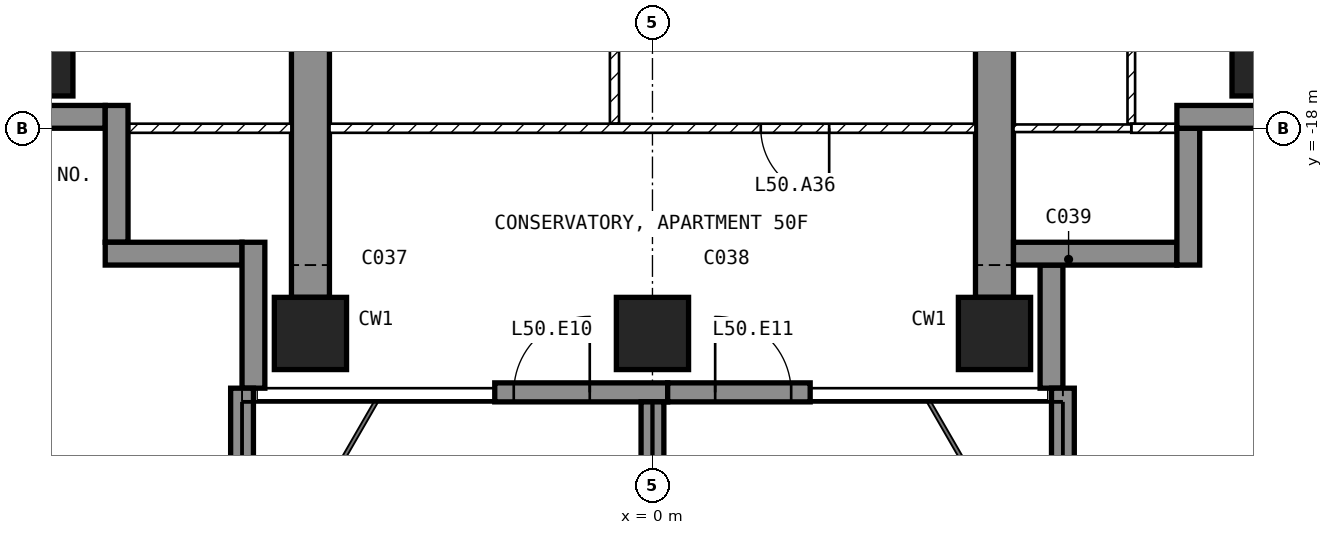
"""IFC4 building model, lengths in metres.
Left out: names, types, materials, properties, quantities, classifications, styles, units other than length and angle.
Written with IfcOpenShell. Run it as: python <this file> out.ifc"""

import sys

from ifc_helpers import new_model, si_unit, direction, frame, frame_2d, origin, origin_2d, place, context, subcontext, project, spatial, polyline, rectangle, outline, extrude, element, fill, save


model = new_model("IFC4")
c1 = context("Model", 3, precision=1e-05, world=origin(), true_north=direction((0.0, 1.0)))
c2 = subcontext(c1, "Body", "Model", "MODEL_VIEW")
j1 = project(units=[si_unit("LENGTHUNIT", "METRE"), si_unit("PLANEANGLEUNIT", "RADIAN")], contexts=[c1])
p1 = place(None, origin())
s1 = spatial("IfcSite", under=j1, at=p1, CompositionType="ELEMENT")
p2 = place(p1, origin())
s2 = spatial("IfcBuilding", under=s1, at=p2, CompositionType="ELEMENT")
p3 = place(p2, frame((0.0, 0.0, 201.6)))
s3 = spatial("IfcBuildingStorey", under=s2, at=p3, CompositionType="ELEMENT", Elevation=201.6)
for number, where, z_axis, x_axis in (
    (1, (-8.1, -17.1, -0.25), (0.0, 0.0, 1.0), (1.0, 0.0, 0.0)),
    (2, (-4.5, -20.7, -0.25), (0.0, 0.0, 1.0), (1.0, 0.0, 0.0)),
    (3, (0.0, -20.7, -0.25), (0.0, 0.0, 1.0), (1.0, 0.0, 0.0)),
    (4, (4.5, -20.7, -0.25), (0.0, 0.0, 1.0), (1.0, 0.0, 0.0)),
    (5, (8.1, -17.1, -0.25), (0.0, 0.0, 1.0), (1.0, 0.0, 0.0)),
):
    element("IfcColumn", number, at=place(p3, frame(where, z_axis=z_axis, x_axis=x_axis)), inside=s3, PredefinedType="COLUMN", context=c2, shape_type="SweptSolid", body=[
        extrude(rectangle(XDim=0.95, YDim=0.95, at=origin_2d()), origin(), (0.0, 0.0, 1.0), 3.5),
    ])
for number, where, z_axis, x_axis in (
    (6, (-4.75, -20.225, -0.25), (1.0, 0.0, 0.0), (0.0, 1.0, 0.0)),
    (7, (4.25, -20.225, -0.25), (1.0, 0.0, 0.0), (0.0, 1.0, 0.0)),
):
    element("IfcWall", number, at=place(p3, frame(where, z_axis=z_axis, x_axis=x_axis)), inside=s3, PredefinedType="SHEAR", context=c2, shape_type="SweptSolid", body=[
        extrude(outline(polyline([(0.0, 0.0), (6.725, 0.0), (6.725, 2.65), (9.125, 2.65), (9.125, 0.0), (11.225, 0.0), (11.225, 3.5), (0.0, 3.5), (0.0, 0.0)])), origin(), (0.0, 0.0, 1.0), 0.5),
    ])
p4 = place(p3, frame((-2.075, -21.475, 0.0), z_axis=(0.0, 0.0, 1.0), x_axis=(1.0, 0.0, 0.0)))
e8 = element("IfcWall", 8, at=p4, inside=s3, PredefinedType="SOLIDWALL", context=c2, shape_type="SweptSolid", body=[
    extrude(rectangle(XDim=2.275, YDim=0.25, at=frame_2d((1.137, 0.0))), origin(), (0.0, 0.0, 1.0), 3.25),
])
p5 = place(p4, frame((0.25, 0.0, 0.0)))
e9 = element("IfcOpeningElement", 9, at=p5, cuts=e8, PredefinedType="OPENING", context=c2, shape_type="SweptSolid", body=[
    extrude(rectangle(XDim=1.0, YDim=2.4, at=frame_2d((0.5, 1.2))), frame((0.0, 0.135, 0.0), z_axis=(0.0, -1.0, 0.0), x_axis=(1.0, 0.0, 0.0)), (0.0, 0.0, 1.0), 0.27),
])
p6 = place(p3, frame((0.2, -21.475, 0.0), z_axis=(0.0, 0.0, 1.0), x_axis=(1.0, 0.0, 0.0)))
e10 = element("IfcWall", 10, at=p6, inside=s3, PredefinedType="SOLIDWALL", context=c2, shape_type="SweptSolid", body=[
    extrude(rectangle(XDim=1.875, YDim=0.25, at=frame_2d((0.938, 0.0))), origin(), (0.0, 0.0, 1.0), 3.25),
])
p7 = place(p6, frame((0.625, 0.0, 0.0)))
e11 = element("IfcOpeningElement", 11, at=p7, cuts=e10, PredefinedType="OPENING", context=c2, shape_type="SweptSolid", body=[
    extrude(rectangle(XDim=1.0, YDim=2.4, at=frame_2d((0.5, 1.2))), frame((0.0, 0.135, 0.0), z_axis=(0.0, -1.0, 0.0), x_axis=(1.0, 0.0, 0.0)), (0.0, 0.0, 1.0), 0.27),
])
p8 = place(p3, frame((5.25, -21.42, 0.0), z_axis=(0.0, 0.0, 1.0), x_axis=(0.0, 1.0, 0.0)))
e12 = element("IfcWall", 12, at=p8, inside=s3, PredefinedType="SOLIDWALL", context=c2, shape_type="SweptSolid", body=[
    extrude(rectangle(XDim=1.62, YDim=0.3, at=frame_2d((0.81, 0.0))), origin(), (0.0, 0.0, 1.0), 3.25),
])
p9 = place(p3, frame((4.75, -19.65, 0.0), z_axis=(0.0, 0.0, 1.0), x_axis=(1.0, 0.0, 0.0)))
e13 = element("IfcWall", 13, at=p9, inside=s3, PredefinedType="SOLIDWALL", context=c2, shape_type="SweptSolid", body=[
    extrude(rectangle(XDim=2.15, YDim=0.3, at=frame_2d((1.075, 0.0))), origin(), (0.0, 0.0, 1.0), 3.25),
])
p10 = place(p3, frame((7.05, -19.8, 0.0), z_axis=(0.0, 0.0, 1.0), x_axis=(0.0, 1.0, 0.0)))
e14 = element("IfcWall", 14, at=p10, inside=s3, PredefinedType="SOLIDWALL", context=c2, shape_type="SweptSolid", body=[
    extrude(rectangle(XDim=1.8, YDim=0.3, at=frame_2d((0.9, 0.0))), origin(), (0.0, 0.0, 1.0), 3.25),
])
p11 = place(p3, frame((6.9, -17.85, 0.0), z_axis=(0.0, 0.0, 1.0), x_axis=(1.0, 0.0, 0.0)))
e15 = element("IfcWall", 15, at=p11, inside=s3, PredefinedType="SOLIDWALL", context=c2, shape_type="SweptSolid", body=[
    extrude(rectangle(XDim=1.85, YDim=0.3, at=frame_2d((0.925, 0.0))), origin(), (0.0, 0.0, 1.0), 3.25),
])
p12 = place(p3, frame((-8.75, -17.85, 0.0), z_axis=(0.0, 0.0, 1.0), x_axis=(1.0, 0.0, 0.0)))
e16 = element("IfcWall", 16, at=p12, inside=s3, PredefinedType="SOLIDWALL", context=c2, shape_type="SweptSolid", body=[
    extrude(rectangle(XDim=1.55, YDim=0.3, at=frame_2d((0.775, 0.0))), origin(), (0.0, 0.0, 1.0), 3.25),
])
for number, where, z_axis, x_axis in (
    (17, (-7.05, -17.7, 0.0), (0.0, 0.0, 1.0), (0.0, -1.0, 0.0)),
    (18, (-7.2, -19.65, 0.0), (0.0, 0.0, 1.0), (1.0, 0.0, 0.0)),
):
    element("IfcWall", number, at=place(p3, frame(where, z_axis=z_axis, x_axis=x_axis)), inside=s3, PredefinedType="SOLIDWALL", context=c2, shape_type="SweptSolid", body=[
        extrude(rectangle(XDim=1.8, YDim=0.3, at=frame_2d((0.9, 0.0))), origin(), (0.0, 0.0, 1.0), 3.25),
    ])
p13 = place(p3, frame((-5.25, -19.5, 0.0), z_axis=(0.0, 0.0, 1.0), x_axis=(0.0, -1.0, 0.0)))
e19 = element("IfcWall", 19, at=p13, inside=s3, PredefinedType="SOLIDWALL", context=c2, shape_type="SweptSolid", body=[
    extrude(rectangle(XDim=1.92, YDim=0.3, at=frame_2d((0.96, 0.0))), origin(), (0.0, 0.0, 1.0), 3.25),
])
p14 = place(p3, frame((-5.4, -21.42, 0.0), z_axis=(0.0, 0.0, 1.0), x_axis=(0.0, -1.0, 0.0)))
e20 = element("IfcWall", 20, at=p14, inside=s3, PredefinedType="SOLIDWALL", context=c2, shape_type="SweptSolid", body=[
    extrude(rectangle(XDim=2.88, YDim=0.3, at=frame_2d((1.44, 0.0))), origin(), (0.0, 0.0, 1.0), 3.25),
])
p15 = place(p3, frame((0.0, -21.6, 0.0), z_axis=(0.0, 0.0, 1.0), x_axis=(0.0, -1.0, 0.0)))
e21 = element("IfcWall", 21, at=p15, inside=s3, PredefinedType="SOLIDWALL", context=c2, shape_type="SweptSolid", body=[
    extrude(rectangle(XDim=2.7, YDim=0.3, at=frame_2d((1.35, 0.0))), origin(), (0.0, 0.0, 1.0), 3.25),
])
p16 = place(p3, frame((5.4, -21.42, 0.0), z_axis=(0.0, 0.0, 1.0), x_axis=(0.0, -1.0, 0.0)))
e22 = element("IfcWall", 22, at=p16, inside=s3, PredefinedType="SOLIDWALL", context=c2, shape_type="SweptSolid", body=[
    extrude(rectangle(XDim=2.88, YDim=0.3, at=frame_2d((1.44, 0.0))), origin(), (0.0, 0.0, 1.0), 3.25),
])
p17 = place(p3, frame((-0.5, -17.94, 0.0), z_axis=(0.0, 0.0, 1.0), x_axis=(0.0, 1.0, 0.0)))
e23 = element("IfcWall", 23, at=p17, inside=s3, PredefinedType="PARTITIONING", context=c2, shape_type="SweptSolid", body=[
    extrude(rectangle(XDim=2.88, YDim=0.12, at=frame_2d((1.44, 0.0))), origin(), (0.0, 0.0, 1.0), 3.25),
])
p18 = place(p17, frame((0.99, 0.0, 0.0)))
e24 = element("IfcOpeningElement", 24, at=p18, cuts=e23, PredefinedType="OPENING", context=c2, shape_type="SweptSolid", body=[
    extrude(rectangle(XDim=0.9, YDim=2.1, at=frame_2d((0.45, 1.05))), frame((0.0, 0.07, 0.0), z_axis=(0.0, -1.0, 0.0), x_axis=(1.0, 0.0, 0.0)), (0.0, 0.0, 1.0), 0.14),
])
p19 = place(p3, frame((4.25, -18.0, 0.0), z_axis=(0.0, 0.0, 1.0), x_axis=(-1.0, 0.0, 0.0)))
e25 = element("IfcWall", 25, at=p19, inside=s3, PredefinedType="PARTITIONING", context=c2, shape_type="SweptSolid", body=[
    extrude(rectangle(XDim=8.5, YDim=0.12, at=frame_2d((4.25, 0.0))), origin(), (0.0, 0.0, 1.0), 3.25),
])
p20 = place(p19, frame((1.925, 0.0, 0.0)))
e26 = element("IfcOpeningElement", 26, at=p20, cuts=e25, PredefinedType="OPENING", context=c2, shape_type="SweptSolid", body=[
    extrude(rectangle(XDim=0.9, YDim=2.1, at=frame_2d((0.45, 1.05))), frame((0.0, 0.07, 0.0), z_axis=(0.0, -1.0, 0.0), x_axis=(1.0, 0.0, 0.0)), (0.0, 0.0, 1.0), 0.14),
])
p21 = place(p3, frame((6.3, -17.94, 0.0), z_axis=(0.0, 0.0, 1.0), x_axis=(0.0, 1.0, 0.0)))
e27 = element("IfcWall", 27, at=p21, inside=s3, PredefinedType="PARTITIONING", context=c2, shape_type="SweptSolid", body=[
    extrude(rectangle(XDim=3.49, YDim=0.1, at=frame_2d((1.745, 0.0))), origin(), (0.0, 0.0, 1.0), 3.25),
])
p22 = place(p21, frame((1.32, 0.0, 0.0)))
e28 = element("IfcOpeningElement", 28, at=p22, cuts=e27, PredefinedType="OPENING", context=c2, shape_type="SweptSolid", body=[
    extrude(rectangle(XDim=0.85, YDim=2.1, at=frame_2d((0.425, 1.05))), frame((0.0, 0.06, 0.0), z_axis=(0.0, -1.0, 0.0), x_axis=(1.0, 0.0, 0.0)), (0.0, 0.0, 1.0), 0.12),
])
p23 = place(p3, frame((7.12, -18.0, 0.0), z_axis=(0.0, 0.0, 1.0), x_axis=(-1.0, 0.0, 0.0)))
e29 = element("IfcWall", 29, at=p23, inside=s3, PredefinedType="PARTITIONING", context=c2, shape_type="SweptSolid", body=[
    extrude(rectangle(XDim=0.82, YDim=0.12, at=frame_2d((0.41, 0.0))), origin(), (0.0, 0.0, 1.0), 3.25),
])
p24 = place(p3, frame((6.3, -18.0, 0.0), z_axis=(0.0, 0.0, 1.0), x_axis=(-1.0, 0.0, 0.0)))
e30 = element("IfcWall", 30, at=p24, inside=s3, PredefinedType="PARTITIONING", context=c2, shape_type="SweptSolid", body=[
    extrude(rectangle(XDim=1.55, YDim=0.1, at=frame_2d((0.775, 0.0))), origin(), (0.0, 0.0, 1.0), 3.25),
])
p25 = place(p3, frame((-4.75, -18.0, 0.0), z_axis=(0.0, 0.0, 1.0), x_axis=(-1.0, 0.0, 0.0)))
e31 = element("IfcWall", 31, at=p25, inside=s3, PredefinedType="PARTITIONING", context=c2, shape_type="SweptSolid", body=[
    extrude(rectangle(XDim=2.37, YDim=0.12, at=frame_2d((1.185, 0.0))), origin(), (0.0, 0.0, 1.0), 3.25),
])
p26 = place(p5, origin())
e32 = element("IfcDoor", 32, at=p26, inside=s3, OperationType="SINGLE_SWING_RIGHT", PredefinedType="DOOR", context=c2, shape_type="SweptSolid", body=[
    extrude(rectangle(XDim=1.0, YDim=2.4, at=frame_2d((0.5, 1.2))), frame((0.0, 0.025, 0.0), z_axis=(0.0, -1.0, 0.0), x_axis=(1.0, 0.0, 0.0)), (0.0, 0.0, 1.0), 0.05),
])
fill(e9, e32)
p27 = place(p7, origin())
e33 = element("IfcDoor", 33, at=p27, inside=s3, OperationType="SINGLE_SWING_LEFT", PredefinedType="DOOR", context=c2, shape_type="SweptSolid", body=[
    extrude(rectangle(XDim=1.0, YDim=2.4, at=frame_2d((0.5, 1.2))), frame((0.0, 0.025, 0.0), z_axis=(0.0, -1.0, 0.0), x_axis=(1.0, 0.0, 0.0)), (0.0, 0.0, 1.0), 0.05),
])
fill(e11, e33)
p28 = place(p20, origin())
e34 = element("IfcDoor", 34, at=p28, inside=s3, OperationType="SINGLE_SWING_LEFT", PredefinedType="DOOR", context=c2, shape_type="SweptSolid", body=[
    extrude(rectangle(XDim=0.9, YDim=2.1, at=frame_2d((0.45, 1.05))), frame((0.0, 0.025, 0.0), z_axis=(0.0, -1.0, 0.0), x_axis=(1.0, 0.0, 0.0)), (0.0, 0.0, 1.0), 0.05),
])
fill(e26, e34)
save(model, sys.argv[1])
